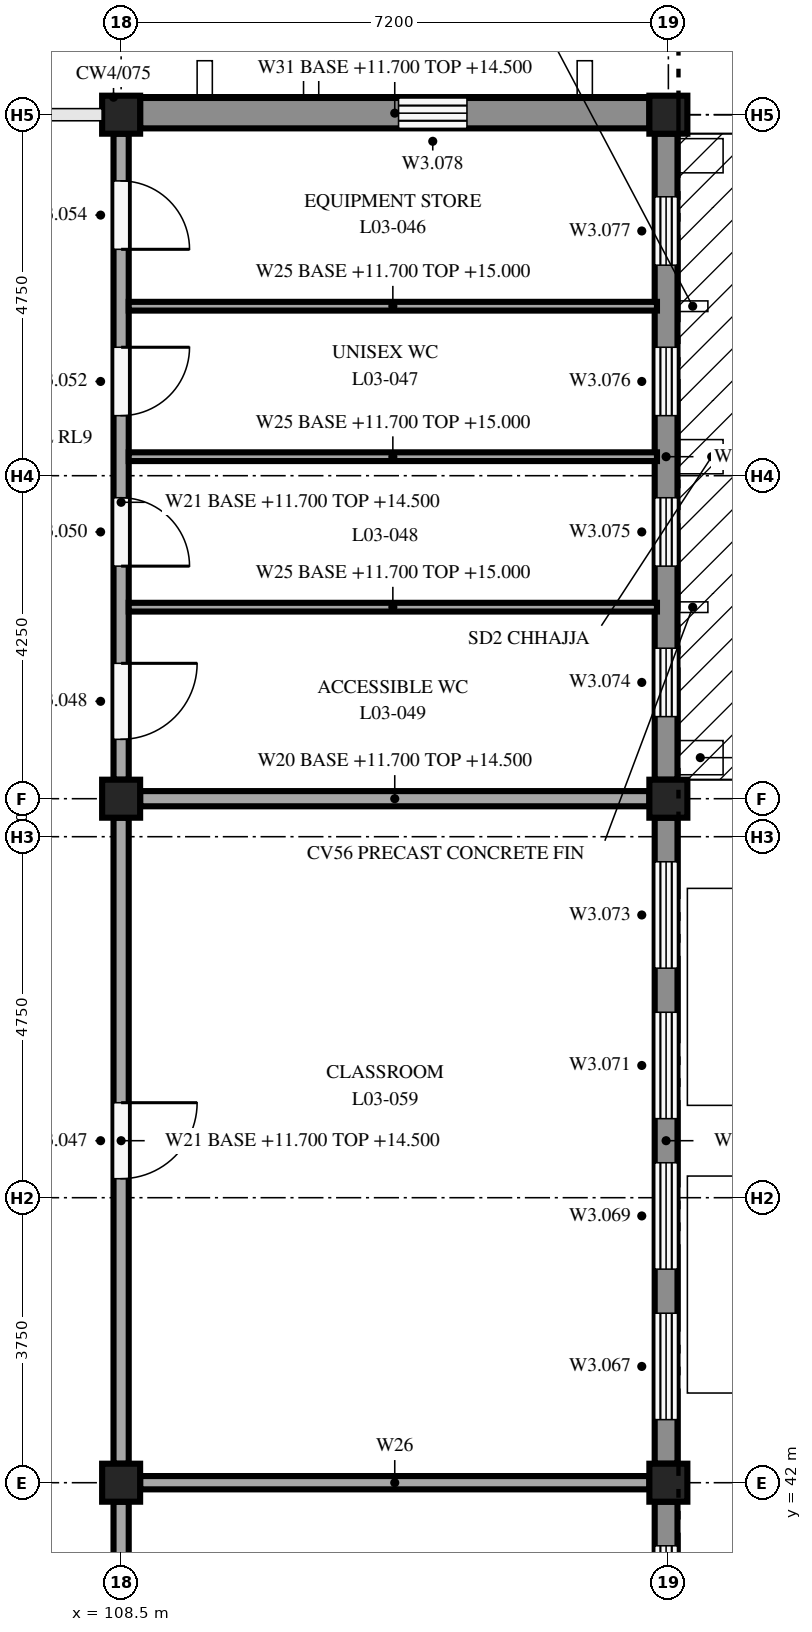
"""IFC4 building model, lengths in metres.
Left out: names, types, materials, properties, quantities, classifications, styles, units other than length and angle.
Written with IfcOpenShell. Run it as: python <this file> out.ifc"""

import sys

from ifc_helpers import new_model, si_unit, direction, frame, frame_2d, origin, origin_2d, place, context, subcontext, project, spatial, rectangle, extrude, element, fill, save


model = new_model("IFC4")
c1 = context("Model", 3, precision=1e-05, world=origin(), true_north=direction((0.0, 1.0)))
c2 = subcontext(c1, "Body", "Model", "MODEL_VIEW")
j1 = project(units=[si_unit("LENGTHUNIT", "METRE"), si_unit("PLANEANGLEUNIT", "RADIAN")], contexts=[c1])
p1 = place(None, origin())
s1 = spatial("IfcSite", under=j1, at=p1, CompositionType="ELEMENT")
p2 = place(p1, origin())
s2 = spatial("IfcBuilding", under=s1, at=p2, CompositionType="ELEMENT")
p3 = place(p2, frame((0.0, 0.0, 11.7)))
s3 = spatial("IfcBuildingStorey", under=s2, at=p3, CompositionType="ELEMENT", Elevation=11.7)
for number, where, z_axis, x_axis in (
    (1, (108.5, 42.0, 0.0), (0.0, 0.0, 1.0), (1.0, 0.0, 0.0)),
    (2, (108.5, 51.0, 0.0), (0.0, 0.0, 1.0), (1.0, 0.0, 0.0)),
    (3, (108.5, 60.0, 0.0), (0.0, 0.0, 1.0), (1.0, 0.0, 0.0)),
    (4, (115.7, 42.0, 0.0), (0.0, 0.0, 1.0), (1.0, 0.0, 0.0)),
    (5, (115.7, 51.0, 0.0), (0.0, 0.0, 1.0), (1.0, 0.0, 0.0)),
    (6, (115.7, 60.0, 0.0), (0.0, 0.0, 1.0), (1.0, 0.0, 0.0)),
):
    element("IfcColumn", number, at=place(p3, frame(where, z_axis=z_axis, x_axis=x_axis)), inside=s3, PredefinedType="COLUMN", context=c2, shape_type="SweptSolid", body=[
        extrude(rectangle(XDim=0.5, YDim=0.5, at=origin_2d()), origin(), (0.0, 0.0, 1.0), 3.3),
    ])
p4 = place(p3, frame((115.67, 41.75, 0.0), z_axis=(0.0, 0.0, 1.0), x_axis=(0.0, -1.0, 0.0)))
e7 = element("IfcWall", 7, at=p4, inside=s3, PredefinedType="STANDARD", context=c2, shape_type="SweptSolid", body=[
    extrude(rectangle(XDim=8.5, YDim=0.3, at=frame_2d((4.25, 0.0))), origin(), (0.0, 0.0, 1.0), 2.75),
])
p5 = place(p4, frame((6.52, 0.0, 0.3)))
e8 = element("IfcOpeningElement", 8, at=p5, cuts=e7, PredefinedType="OPENING", context=c2, shape_type="SweptSolid", body=[
    extrude(rectangle(XDim=1.4, YDim=2.4, at=frame_2d((0.7, 1.2))), frame((0.0, 0.16, 0.0), z_axis=(0.0, -1.0, 0.0), x_axis=(1.0, 0.0, 0.0)), (0.0, 0.0, 1.0), 0.32),
])
p6 = place(p4, frame((4.54, 0.0, 0.3)))
e9 = element("IfcOpeningElement", 9, at=p6, cuts=e7, PredefinedType="OPENING", context=c2, shape_type="SweptSolid", body=[
    extrude(rectangle(XDim=1.4, YDim=2.4, at=frame_2d((0.7, 1.2))), frame((0.0, 0.16, 0.0), z_axis=(0.0, -1.0, 0.0), x_axis=(1.0, 0.0, 0.0)), (0.0, 0.0, 1.0), 0.32),
])
p7 = place(p4, frame((2.56, 0.0, 0.3)))
e10 = element("IfcOpeningElement", 10, at=p7, cuts=e7, PredefinedType="OPENING", context=c2, shape_type="SweptSolid", body=[
    extrude(rectangle(XDim=1.4, YDim=2.4, at=frame_2d((0.7, 1.2))), frame((0.0, 0.16, 0.0), z_axis=(0.0, -1.0, 0.0), x_axis=(1.0, 0.0, 0.0)), (0.0, 0.0, 1.0), 0.32),
])
p8 = place(p4, frame((0.58, 0.0, 0.3)))
e11 = element("IfcOpeningElement", 11, at=p8, cuts=e7, PredefinedType="OPENING", context=c2, shape_type="SweptSolid", body=[
    extrude(rectangle(XDim=1.4, YDim=2.4, at=frame_2d((0.7, 1.2))), frame((0.0, 0.16, 0.0), z_axis=(0.0, -1.0, 0.0), x_axis=(1.0, 0.0, 0.0)), (0.0, 0.0, 1.0), 0.32),
])
p9 = place(p3, frame((115.67, 50.75, 0.0), z_axis=(0.0, 0.0, 1.0), x_axis=(0.0, -1.0, 0.0)))
e12 = element("IfcWall", 12, at=p9, inside=s3, PredefinedType="STANDARD", context=c2, shape_type="SweptSolid", body=[
    extrude(rectangle(XDim=8.5, YDim=0.3, at=frame_2d((4.25, 0.0))), origin(), (0.0, 0.0, 1.0), 2.75),
])
p10 = place(p9, frame((6.52, 0.0, 0.6)))
e13 = element("IfcOpeningElement", 13, at=p10, cuts=e12, PredefinedType="OPENING", context=c2, shape_type="SweptSolid", body=[
    extrude(rectangle(XDim=1.4, YDim=2.1, at=frame_2d((0.7, 1.05))), frame((0.0, 0.16, 0.0), z_axis=(0.0, -1.0, 0.0), x_axis=(1.0, 0.0, 0.0)), (0.0, 0.0, 1.0), 0.32),
])
p11 = place(p9, frame((4.54, 0.0, 0.6)))
e14 = element("IfcOpeningElement", 14, at=p11, cuts=e12, PredefinedType="OPENING", context=c2, shape_type="SweptSolid", body=[
    extrude(rectangle(XDim=1.4, YDim=2.1, at=frame_2d((0.7, 1.05))), frame((0.0, 0.16, 0.0), z_axis=(0.0, -1.0, 0.0), x_axis=(1.0, 0.0, 0.0)), (0.0, 0.0, 1.0), 0.32),
])
p12 = place(p9, frame((2.56, 0.0, 0.6)))
e15 = element("IfcOpeningElement", 15, at=p12, cuts=e12, PredefinedType="OPENING", context=c2, shape_type="SweptSolid", body=[
    extrude(rectangle(XDim=1.4, YDim=2.1, at=frame_2d((0.7, 1.05))), frame((0.0, 0.16, 0.0), z_axis=(0.0, -1.0, 0.0), x_axis=(1.0, 0.0, 0.0)), (0.0, 0.0, 1.0), 0.32),
])
p13 = place(p9, frame((0.58, 0.0, 0.6)))
e16 = element("IfcOpeningElement", 16, at=p13, cuts=e12, PredefinedType="OPENING", context=c2, shape_type="SweptSolid", body=[
    extrude(rectangle(XDim=1.4, YDim=2.1, at=frame_2d((0.7, 1.05))), frame((0.0, 0.16, 0.0), z_axis=(0.0, -1.0, 0.0), x_axis=(1.0, 0.0, 0.0)), (0.0, 0.0, 1.0), 0.32),
])
p14 = place(p3, frame((115.67, 59.75, 0.0), z_axis=(0.0, 0.0, 1.0), x_axis=(0.0, -1.0, 0.0)))
e17 = element("IfcWall", 17, at=p14, inside=s3, PredefinedType="STANDARD", context=c2, shape_type="SweptSolid", body=[
    extrude(rectangle(XDim=8.5, YDim=0.3, at=frame_2d((4.25, 0.0))), origin(), (0.0, 0.0, 1.0), 2.75),
])
p15 = place(p14, frame((6.77, 0.0, 1.6)))
e18 = element("IfcOpeningElement", 18, at=p15, cuts=e17, PredefinedType="OPENING", context=c2, shape_type="SweptSolid", body=[
    extrude(rectangle(XDim=0.9, YDim=1.0, at=frame_2d((0.45, 0.5))), frame((0.0, 0.16, 0.0), z_axis=(0.0, -1.0, 0.0), x_axis=(1.0, 0.0, 0.0)), (0.0, 0.0, 1.0), 0.32),
])
p16 = place(p14, frame((4.79, 0.0, 1.6)))
e19 = element("IfcOpeningElement", 19, at=p16, cuts=e17, PredefinedType="OPENING", context=c2, shape_type="SweptSolid", body=[
    extrude(rectangle(XDim=0.9, YDim=1.0, at=frame_2d((0.45, 0.5))), frame((0.0, 0.16, 0.0), z_axis=(0.0, -1.0, 0.0), x_axis=(1.0, 0.0, 0.0)), (0.0, 0.0, 1.0), 0.32),
])
p17 = place(p14, frame((2.81, 0.0, 1.6)))
e20 = element("IfcOpeningElement", 20, at=p17, cuts=e17, PredefinedType="OPENING", context=c2, shape_type="SweptSolid", body=[
    extrude(rectangle(XDim=0.9, YDim=1.0, at=frame_2d((0.45, 0.5))), frame((0.0, 0.16, 0.0), z_axis=(0.0, -1.0, 0.0), x_axis=(1.0, 0.0, 0.0)), (0.0, 0.0, 1.0), 0.32),
])
p18 = place(p14, frame((0.83, 0.0, 1.6)))
e21 = element("IfcOpeningElement", 21, at=p18, cuts=e17, PredefinedType="OPENING", context=c2, shape_type="SweptSolid", body=[
    extrude(rectangle(XDim=0.9, YDim=1.0, at=frame_2d((0.45, 0.5))), frame((0.0, 0.16, 0.0), z_axis=(0.0, -1.0, 0.0), x_axis=(1.0, 0.0, 0.0)), (0.0, 0.0, 1.0), 0.32),
])
p19 = place(p3, frame((108.75, 60.02, 0.0), z_axis=(0.0, 0.0, 1.0), x_axis=(1.0, 0.0, 0.0)))
e22 = element("IfcWall", 22, at=p19, inside=s3, PredefinedType="STANDARD", context=c2, shape_type="SweptSolid", body=[
    extrude(rectangle(XDim=6.7, YDim=0.4, at=frame_2d((3.35, 0.0))), origin(), (0.0, 0.0, 1.0), 2.8),
])
p20 = place(p19, frame((3.4, 0.0, 1.6)))
e23 = element("IfcOpeningElement", 23, at=p20, cuts=e22, PredefinedType="OPENING", context=c2, shape_type="SweptSolid", body=[
    extrude(rectangle(XDim=0.9, YDim=1.0, at=frame_2d((0.45, 0.5))), frame((0.0, 0.21, 0.0), z_axis=(0.0, -1.0, 0.0), x_axis=(1.0, 0.0, 0.0)), (0.0, 0.0, 1.0), 0.42),
])
p21 = place(p3, frame((108.5, 59.75, 0.0), z_axis=(0.0, 0.0, 1.0), x_axis=(0.0, -1.0, 0.0)))
e24 = element("IfcWall", 24, at=p21, inside=s3, PredefinedType="PARTITIONING", context=c2, shape_type="SweptSolid", body=[
    extrude(rectangle(XDim=8.5, YDim=0.2, at=frame_2d((4.25, 0.0))), origin(), (0.0, 0.0, 1.0), 2.8),
])
p22 = place(p21, frame((6.969, 0.0, 0.0)))
e25 = element("IfcOpeningElement", 25, at=p22, cuts=e24, PredefinedType="OPENING", context=c2, shape_type="SweptSolid", body=[
    extrude(rectangle(XDim=1.0, YDim=2.1, at=frame_2d((0.5, 1.05))), frame((0.0, 0.11, 0.0), z_axis=(0.0, -1.0, 0.0), x_axis=(1.0, 0.0, 0.0)), (0.0, 0.0, 1.0), 0.22),
])
p23 = place(p21, frame((4.79, 0.0, 0.0)))
e26 = element("IfcOpeningElement", 26, at=p23, cuts=e24, PredefinedType="OPENING", context=c2, shape_type="SweptSolid", body=[
    extrude(rectangle(XDim=0.9, YDim=2.1, at=frame_2d((0.45, 1.05))), frame((0.0, 0.11, 0.0), z_axis=(0.0, -1.0, 0.0), x_axis=(1.0, 0.0, 0.0)), (0.0, 0.0, 1.0), 0.22),
])
p24 = place(p21, frame((2.81, 0.0, 0.0)))
e27 = element("IfcOpeningElement", 27, at=p24, cuts=e24, PredefinedType="OPENING", context=c2, shape_type="SweptSolid", body=[
    extrude(rectangle(XDim=0.9, YDim=2.1, at=frame_2d((0.45, 1.05))), frame((0.0, 0.11, 0.0), z_axis=(0.0, -1.0, 0.0), x_axis=(1.0, 0.0, 0.0)), (0.0, 0.0, 1.0), 0.22),
])
p25 = place(p21, frame((0.621, 0.0, 0.0)))
e28 = element("IfcOpeningElement", 28, at=p25, cuts=e24, PredefinedType="OPENING", context=c2, shape_type="SweptSolid", body=[
    extrude(rectangle(XDim=0.9, YDim=2.1, at=frame_2d((0.45, 1.05))), frame((0.0, 0.11, 0.0), z_axis=(0.0, -1.0, 0.0), x_axis=(1.0, 0.0, 0.0)), (0.0, 0.0, 1.0), 0.22),
])
p26 = place(p3, frame((108.75, 51.0, 0.0), z_axis=(0.0, 0.0, 1.0), x_axis=(1.0, 0.0, 0.0)))
e29 = element("IfcWall", 29, at=p26, inside=s3, PredefinedType="PARTITIONING", context=c2, shape_type="SweptSolid", body=[
    extrude(rectangle(XDim=6.7, YDim=0.2, at=frame_2d((3.35, 0.0))), origin(), (0.0, 0.0, 1.0), 2.8),
])
for number, where, z_axis, x_axis in (
    (30, (108.6, 57.48, 0.0), (0.0, 0.0, 1.0), (1.0, 0.0, 0.0)),
    (31, (108.6, 55.5, 0.0), (0.0, 0.0, 1.0), (1.0, 0.0, 0.0)),
    (32, (108.6, 53.52, 0.0), (0.0, 0.0, 1.0), (1.0, 0.0, 0.0)),
):
    element("IfcWall", number, at=place(p3, frame(where, z_axis=z_axis, x_axis=x_axis)), inside=s3, PredefinedType="PARTITIONING", context=c2, shape_type="SweptSolid", body=[
        extrude(rectangle(XDim=6.95, YDim=0.115, at=frame_2d((3.475, 0.0))), origin(), (0.0, 0.0, 1.0), 3.3),
    ])
p27 = place(p3, frame((108.5, 41.75, 0.0), z_axis=(0.0, 0.0, 1.0), x_axis=(0.0, -1.0, 0.0)))
e33 = element("IfcWall", 33, at=p27, inside=s3, PredefinedType="PARTITIONING", context=c2, shape_type="SweptSolid", body=[
    extrude(rectangle(XDim=8.5, YDim=0.2, at=frame_2d((4.25, 0.0))), origin(), (0.0, 0.0, 1.0), 2.8),
])
p28 = place(p27, frame((3.5, 0.0, 0.0)))
e34 = element("IfcOpeningElement", 34, at=p28, cuts=e33, PredefinedType="OPENING", context=c2, shape_type="SweptSolid", body=[
    extrude(rectangle(XDim=1.5, YDim=2.1, at=frame_2d((0.75, 1.05))), frame((0.0, 0.11, 0.0), z_axis=(0.0, -1.0, 0.0), x_axis=(1.0, 0.0, 0.0)), (0.0, 0.0, 1.0), 0.22),
])
p29 = place(p3, frame((108.5, 50.75, 0.0), z_axis=(0.0, 0.0, 1.0), x_axis=(0.0, -1.0, 0.0)))
e35 = element("IfcWall", 35, at=p29, inside=s3, PredefinedType="PARTITIONING", context=c2, shape_type="SweptSolid", body=[
    extrude(rectangle(XDim=8.5, YDim=0.2, at=frame_2d((4.25, 0.0))), origin(), (0.0, 0.0, 1.0), 2.8),
])
p30 = place(p29, frame((3.75, 0.0, 0.0)))
e36 = element("IfcOpeningElement", 36, at=p30, cuts=e35, PredefinedType="OPENING", context=c2, shape_type="SweptSolid", body=[
    extrude(rectangle(XDim=1.0, YDim=2.1, at=frame_2d((0.5, 1.05))), frame((0.0, 0.11, 0.0), z_axis=(0.0, -1.0, 0.0), x_axis=(1.0, 0.0, 0.0)), (0.0, 0.0, 1.0), 0.22),
])
p31 = place(p3, frame((108.75, 42.0, 0.0), z_axis=(0.0, 0.0, 1.0), x_axis=(1.0, 0.0, 0.0)))
e37 = element("IfcWall", 37, at=p31, inside=s3, PredefinedType="PARTITIONING", context=c2, shape_type="SweptSolid", body=[
    extrude(rectangle(XDim=6.7, YDim=0.175, at=frame_2d((3.35, 0.0))), origin(), (0.0, 0.0, 1.0), 2.8),
])
p32 = place(p8, origin())
e38 = element("IfcWindow", 38, at=p32, inside=s3, PartitioningType="DOUBLE_PANEL_VERTICAL", PredefinedType="WINDOW", context=c2, shape_type="SweptSolid", body=[
    extrude(rectangle(XDim=1.4, YDim=2.4, at=frame_2d((0.7, 1.2))), frame((0.0, 0.03, 0.0), z_axis=(0.0, -1.0, 0.0), x_axis=(1.0, 0.0, 0.0)), (0.0, 0.0, 1.0), 0.06),
])
fill(e11, e38)
p33 = place(p10, origin())
e39 = element("IfcWindow", 39, at=p33, inside=s3, PartitioningType="DOUBLE_PANEL_VERTICAL", PredefinedType="WINDOW", context=c2, shape_type="SweptSolid", body=[
    extrude(rectangle(XDim=1.4, YDim=2.1, at=frame_2d((0.7, 1.05))), frame((0.0, 0.03, 0.0), z_axis=(0.0, -1.0, 0.0), x_axis=(1.0, 0.0, 0.0)), (0.0, 0.0, 1.0), 0.06),
])
fill(e13, e39)
p34 = place(p11, origin())
e40 = element("IfcWindow", 40, at=p34, inside=s3, PartitioningType="DOUBLE_PANEL_VERTICAL", PredefinedType="WINDOW", context=c2, shape_type="SweptSolid", body=[
    extrude(rectangle(XDim=1.4, YDim=2.1, at=frame_2d((0.7, 1.05))), frame((0.0, 0.03, 0.0), z_axis=(0.0, -1.0, 0.0), x_axis=(1.0, 0.0, 0.0)), (0.0, 0.0, 1.0), 0.06),
])
fill(e14, e40)
p35 = place(p12, origin())
e41 = element("IfcWindow", 41, at=p35, inside=s3, PartitioningType="DOUBLE_PANEL_VERTICAL", PredefinedType="WINDOW", context=c2, shape_type="SweptSolid", body=[
    extrude(rectangle(XDim=1.4, YDim=2.1, at=frame_2d((0.7, 1.05))), frame((0.0, 0.03, 0.0), z_axis=(0.0, -1.0, 0.0), x_axis=(1.0, 0.0, 0.0)), (0.0, 0.0, 1.0), 0.06),
])
fill(e15, e41)
p36 = place(p13, origin())
e42 = element("IfcWindow", 42, at=p36, inside=s3, PartitioningType="DOUBLE_PANEL_VERTICAL", PredefinedType="WINDOW", context=c2, shape_type="SweptSolid", body=[
    extrude(rectangle(XDim=1.4, YDim=2.1, at=frame_2d((0.7, 1.05))), frame((0.0, 0.03, 0.0), z_axis=(0.0, -1.0, 0.0), x_axis=(1.0, 0.0, 0.0)), (0.0, 0.0, 1.0), 0.06),
])
fill(e16, e42)
p37 = place(p15, origin())
e43 = element("IfcWindow", 43, at=p37, inside=s3, PartitioningType="SINGLE_PANEL", PredefinedType="WINDOW", context=c2, shape_type="SweptSolid", body=[
    extrude(rectangle(XDim=0.9, YDim=1.0, at=frame_2d((0.45, 0.5))), frame((0.0, 0.03, 0.0), z_axis=(0.0, -1.0, 0.0), x_axis=(1.0, 0.0, 0.0)), (0.0, 0.0, 1.0), 0.06),
])
fill(e18, e43)
p38 = place(p16, origin())
e44 = element("IfcWindow", 44, at=p38, inside=s3, PartitioningType="SINGLE_PANEL", PredefinedType="WINDOW", context=c2, shape_type="SweptSolid", body=[
    extrude(rectangle(XDim=0.9, YDim=1.0, at=frame_2d((0.45, 0.5))), frame((0.0, 0.03, 0.0), z_axis=(0.0, -1.0, 0.0), x_axis=(1.0, 0.0, 0.0)), (0.0, 0.0, 1.0), 0.06),
])
fill(e19, e44)
p39 = place(p17, origin())
e45 = element("IfcWindow", 45, at=p39, inside=s3, PartitioningType="SINGLE_PANEL", PredefinedType="WINDOW", context=c2, shape_type="SweptSolid", body=[
    extrude(rectangle(XDim=0.9, YDim=1.0, at=frame_2d((0.45, 0.5))), frame((0.0, 0.03, 0.0), z_axis=(0.0, -1.0, 0.0), x_axis=(1.0, 0.0, 0.0)), (0.0, 0.0, 1.0), 0.06),
])
fill(e20, e45)
p40 = place(p18, origin())
e46 = element("IfcWindow", 46, at=p40, inside=s3, PartitioningType="SINGLE_PANEL", PredefinedType="WINDOW", context=c2, shape_type="SweptSolid", body=[
    extrude(rectangle(XDim=0.9, YDim=1.0, at=frame_2d((0.45, 0.5))), frame((0.0, 0.03, 0.0), z_axis=(0.0, -1.0, 0.0), x_axis=(1.0, 0.0, 0.0)), (0.0, 0.0, 1.0), 0.06),
])
fill(e21, e46)
p41 = place(p20, origin())
e47 = element("IfcWindow", 47, at=p41, inside=s3, PartitioningType="SINGLE_PANEL", PredefinedType="WINDOW", context=c2, shape_type="SweptSolid", body=[
    extrude(rectangle(XDim=0.9, YDim=1.0, at=frame_2d((0.45, 0.5))), frame((0.0, 0.03, 0.0), z_axis=(0.0, -1.0, 0.0), x_axis=(1.0, 0.0, 0.0)), (0.0, 0.0, 1.0), 0.06),
])
fill(e23, e47)
p42 = place(p22, origin())
e48 = element("IfcDoor", 48, at=p42, inside=s3, OperationType="SINGLE_SWING_LEFT", PredefinedType="DOOR", context=c2, shape_type="SweptSolid", body=[
    extrude(rectangle(XDim=1.0, YDim=2.1, at=frame_2d((0.5, 1.05))), frame((0.0, 0.025, 0.0), z_axis=(0.0, -1.0, 0.0), x_axis=(1.0, 0.0, 0.0)), (0.0, 0.0, 1.0), 0.05),
])
fill(e25, e48)
p43 = place(p23, origin())
e49 = element("IfcDoor", 49, at=p43, inside=s3, OperationType="SINGLE_SWING_RIGHT", PredefinedType="DOOR", context=c2, shape_type="SweptSolid", body=[
    extrude(rectangle(XDim=0.9, YDim=2.1, at=frame_2d((0.45, 1.05))), frame((0.0, 0.025, 0.0), z_axis=(0.0, -1.0, 0.0), x_axis=(1.0, 0.0, 0.0)), (0.0, 0.0, 1.0), 0.05),
])
fill(e26, e49)
p44 = place(p24, origin())
e50 = element("IfcDoor", 50, at=p44, inside=s3, OperationType="SINGLE_SWING_LEFT", PredefinedType="DOOR", context=c2, shape_type="SweptSolid", body=[
    extrude(rectangle(XDim=0.9, YDim=2.1, at=frame_2d((0.45, 1.05))), frame((0.0, 0.025, 0.0), z_axis=(0.0, -1.0, 0.0), x_axis=(1.0, 0.0, 0.0)), (0.0, 0.0, 1.0), 0.05),
])
fill(e27, e50)
p45 = place(p25, origin())
e51 = element("IfcDoor", 51, at=p45, inside=s3, OperationType="SINGLE_SWING_RIGHT", PredefinedType="DOOR", context=c2, shape_type="SweptSolid", body=[
    extrude(rectangle(XDim=0.9, YDim=2.1, at=frame_2d((0.45, 1.05))), frame((0.0, 0.025, 0.0), z_axis=(0.0, -1.0, 0.0), x_axis=(1.0, 0.0, 0.0)), (0.0, 0.0, 1.0), 0.05),
])
fill(e28, e51)
p46 = place(p30, origin())
e52 = element("IfcDoor", 52, at=p46, inside=s3, OperationType="SINGLE_SWING_LEFT", PredefinedType="DOOR", context=c2, shape_type="SweptSolid", body=[
    extrude(rectangle(XDim=1.0, YDim=2.1, at=frame_2d((0.5, 1.05))), frame((0.0, 0.025, 0.0), z_axis=(0.0, -1.0, 0.0), x_axis=(1.0, 0.0, 0.0)), (0.0, 0.0, 1.0), 0.05),
])
fill(e36, e52)
save(model, sys.argv[1])
